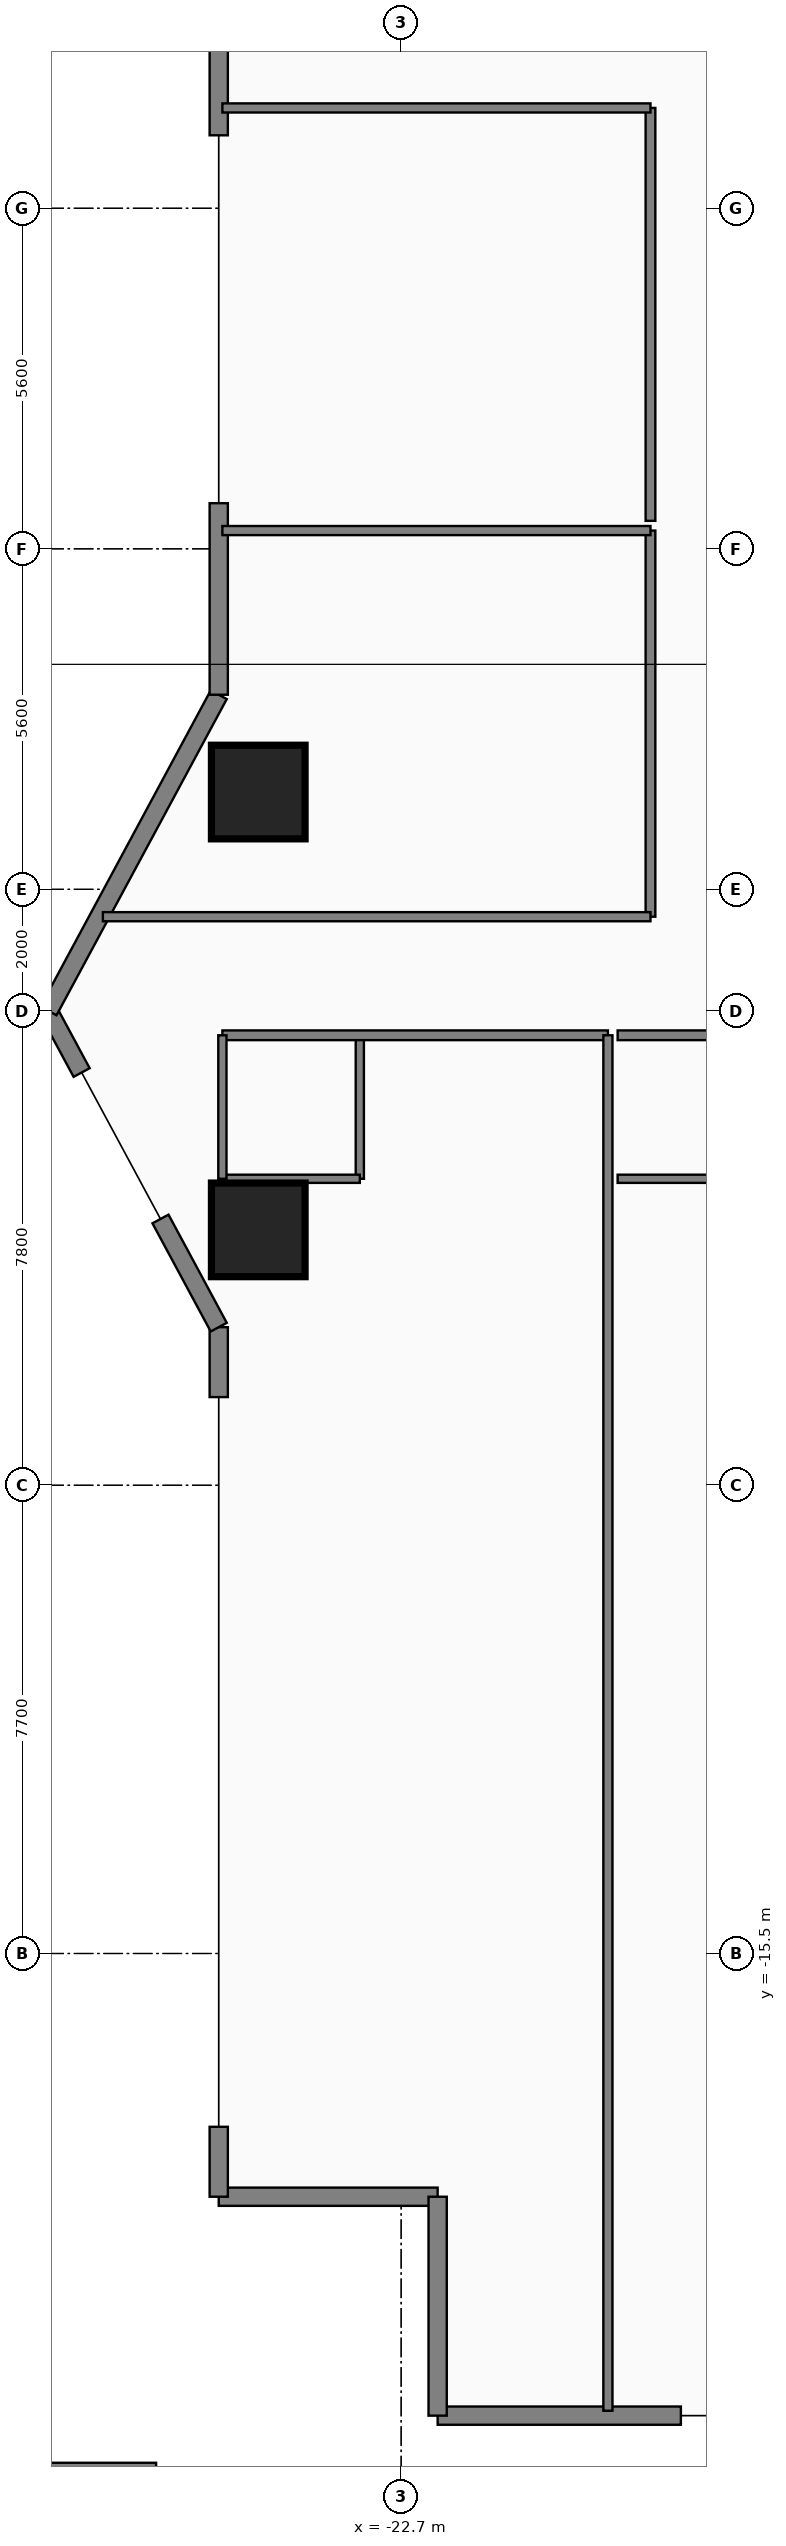
"""IFC4 building model, lengths in metres.
Left out: names, types, materials, properties, quantities, classifications, styles, units other than length and angle.
Written with IfcOpenShell. Run it as: python <this file> out.ifc"""

import sys

from ifc_helpers import new_model, si_unit, direction, frame, frame_2d, origin, origin_2d, place, context, subcontext, project, spatial, rectangle, extrude, element, fill, save


model = new_model("IFC4")
c1 = context("Model", 3, precision=1e-05, world=origin(), true_north=direction((0.0, 1.0)))
c2 = subcontext(c1, "Body", "Model", "MODEL_VIEW")
j1 = project(units=[si_unit("LENGTHUNIT", "METRE"), si_unit("PLANEANGLEUNIT", "RADIAN")], contexts=[c1])
p1 = place(None, origin())
s1 = spatial("IfcSite", under=j1, at=p1, CompositionType="ELEMENT")
p2 = place(p1, origin())
s2 = spatial("IfcBuilding", under=s1, at=p2, CompositionType="ELEMENT")
p3 = place(p2, frame((0.0, 0.0, 27.6)))
s3 = spatial("IfcBuildingStorey", under=s2, at=p3, CompositionType="ELEMENT", Elevation=27.6)
for number, where, z_axis, x_axis in (
    (1, (-25.05, -3.6, 0.0), (0.0, 0.0, 1.0), (1.0, 0.0, 0.0)),
    (2, (-25.05, 3.6, 0.0), (0.0, 0.0, 1.0), (1.0, 0.0, 0.0)),
):
    element("IfcColumn", number, at=place(p3, frame(where, z_axis=z_axis, x_axis=x_axis)), inside=s3, PredefinedType="COLUMN", context=c2, shape_type="SweptSolid", body=[
        extrude(rectangle(XDim=1.5, YDim=1.5, at=origin_2d()), origin(), (0.0, 0.0, 1.0), 3.65),
    ])
p4 = place(p3, frame((-26.73, -24.0, 0.0), z_axis=(0.0, 0.0, 1.0), x_axis=(-1.0, 0.0, 0.0)))
e3 = element("IfcWall", 3, at=p4, inside=s3, PredefinedType="PARAPET", context=c2, shape_type="SweptSolid", body=[
    extrude(rectangle(XDim=5.09, YDim=0.25, at=frame_2d((2.545, 0.0))), origin(), (0.0, 0.0, 1.0), 1.15),
])
p5 = place(p3, frame((-22.1, -19.5, 0.0), z_axis=(0.0, 0.0, 1.0), x_axis=(-1.0, 0.0, 0.0)))
e4 = element("IfcWall", 4, at=p5, inside=s3, PredefinedType="STANDARD", context=c2, shape_type="SweptSolid", body=[
    extrude(rectangle(XDim=3.6, YDim=0.3, at=frame_2d((1.8, 0.0))), origin(), (0.0, 0.0, 1.0), 3.43),
])
p6 = place(p3, frame((-25.7, -19.5, 0.0), z_axis=(0.0, 0.0, 1.0), x_axis=(0.0, 1.0, 0.0)))
e5 = element("IfcWall", 5, at=p6, inside=s3, PredefinedType="STANDARD", context=c2, shape_type="SweptSolid", body=[
    extrude(rectangle(XDim=1.15, YDim=0.3, at=frame_2d((0.575, 0.0))), origin(), (0.0, 0.0, 1.0), 3.43),
])
p7 = place(p3, frame((-25.7, -6.35, 0.0), z_axis=(0.0, 0.0, 1.0), x_axis=(0.0, 1.0, 0.0)))
e6 = element("IfcWall", 6, at=p7, inside=s3, PredefinedType="STANDARD", context=c2, shape_type="SweptSolid", body=[
    extrude(rectangle(XDim=1.15, YDim=0.3, at=frame_2d((0.575, 0.0))), origin(), (0.0, 0.0, 1.0), 3.43),
])
p8 = place(p3, frame((-25.7, -5.2, 0.0), z_axis=(0.0, 0.0, 1.0), x_axis=(-0.474121438562, 0.88045946045, 0.0)))
e7 = element("IfcWall", 7, at=p8, inside=s3, PredefinedType="STANDARD", context=c2, shape_type="SweptSolid", body=[
    extrude(rectangle(XDim=2.021, YDim=0.3, at=frame_2d((1.01, 0.0))), origin(), (0.0, 0.0, 1.0), 3.43),
])
p9 = place(p3, frame((-27.955, -1.012, 0.0), z_axis=(0.0, 0.0, 1.0), x_axis=(-0.474099823035, 0.880471099922, 0.0)))
e8 = element("IfcWall", 8, at=p9, inside=s3, PredefinedType="STANDARD", context=c2, shape_type="SweptSolid", body=[
    extrude(rectangle(XDim=1.15, YDim=0.3, at=frame_2d((0.575, 0.0))), origin(), (0.0, 0.0, 1.0), 3.43),
])
p10 = place(p3, frame((-28.5, 0.0, 0.0), z_axis=(0.0, 0.0, 1.0), x_axis=(0.474109683532, 0.880465790352, 0.0)))
e9 = element("IfcWall", 9, at=p10, inside=s3, PredefinedType="STANDARD", context=c2, shape_type="SweptSolid", body=[
    extrude(rectangle(XDim=5.906, YDim=0.3, at=frame_2d((2.953, 0.0))), origin(), (0.0, 0.0, 1.0), 3.43),
])
p11 = place(p10, frame((2.432, 0.0, 0.95)))
e10 = element("IfcOpeningElement", 10, at=p11, cuts=e9, PredefinedType="OPENING", context=c2, shape_type="SweptSolid", body=[
    extrude(rectangle(XDim=1.15, YDim=1.55, at=frame_2d((0.575, 0.775))), frame((0.0, 0.16, 0.0), z_axis=(0.0, -1.0, 0.0), x_axis=(1.0, 0.0, 0.0)), (0.0, 0.0, 1.0), 0.32),
])
p12 = place(p3, frame((-25.7, 5.2, 0.0), z_axis=(0.0, 0.0, 1.0), x_axis=(0.0, 1.0, 0.0)))
e11 = element("IfcWall", 11, at=p12, inside=s3, PredefinedType="STANDARD", context=c2, shape_type="SweptSolid", body=[
    extrude(rectangle(XDim=3.15, YDim=0.3, at=frame_2d((1.575, 0.0))), origin(), (0.0, 0.0, 1.0), 3.43),
])
p13 = place(p12, frame((0.835, 0.0, 0.95)))
e12 = element("IfcOpeningElement", 12, at=p13, cuts=e11, PredefinedType="OPENING", context=c2, shape_type="SweptSolid", body=[
    extrude(rectangle(XDim=1.15, YDim=1.55, at=frame_2d((0.575, 0.775))), frame((0.0, 0.16, 0.0), z_axis=(0.0, -1.0, 0.0), x_axis=(1.0, 0.0, 0.0)), (0.0, 0.0, 1.0), 0.32),
])
p14 = place(p3, frame((-25.7, 14.4, 0.0), z_axis=(0.0, 0.0, 1.0), x_axis=(0.0, 1.0, 0.0)))
e13 = element("IfcWall", 13, at=p14, inside=s3, PredefinedType="STANDARD", context=c2, shape_type="SweptSolid", body=[
    extrude(rectangle(XDim=5.1, YDim=0.3, at=frame_2d((2.55, 0.0))), origin(), (0.0, 0.0, 1.0), 3.43),
])
p15 = place(p14, frame((0.8, 0.0, 0.95)))
e14 = element("IfcOpeningElement", 14, at=p15, cuts=e13, PredefinedType="OPENING", context=c2, shape_type="SweptSolid", body=[
    extrude(rectangle(XDim=1.15, YDim=1.55, at=frame_2d((0.575, 0.775))), frame((0.0, 0.16, 0.0), z_axis=(0.0, -1.0, 0.0), x_axis=(1.0, 0.0, 0.0)), (0.0, 0.0, 1.0), 0.32),
])
p16 = place(p14, frame((2.84, 0.0, 0.85)))
e15 = element("IfcOpeningElement", 15, at=p16, cuts=e13, PredefinedType="OPENING", context=c2, shape_type="SweptSolid", body=[
    extrude(rectangle(XDim=1.6, YDim=1.8, at=frame_2d((0.8, 0.9))), frame((0.0, 0.16, 0.0), z_axis=(0.0, -1.0, 0.0), x_axis=(1.0, 0.0, 0.0)), (0.0, 0.0, 1.0), 0.32),
])
p17 = place(p3, frame((-18.1, -23.1, 0.0), z_axis=(0.0, 0.0, 1.0), x_axis=(-1.0, 0.0, 0.0)))
e16 = element("IfcWall", 16, at=p17, inside=s3, PredefinedType="STANDARD", context=c2, shape_type="SweptSolid", body=[
    extrude(rectangle(XDim=4.0, YDim=0.3, at=frame_2d((2.0, 0.0))), origin(), (0.0, 0.0, 1.0), 3.43),
])
p18 = place(p17, frame((1.74, 0.0, 0.85)))
e17 = element("IfcOpeningElement", 17, at=p18, cuts=e16, PredefinedType="OPENING", context=c2, shape_type="SweptSolid", body=[
    extrude(rectangle(XDim=1.6, YDim=1.8, at=frame_2d((0.8, 0.9))), frame((0.0, 0.16, 0.0), z_axis=(0.0, -1.0, 0.0), x_axis=(1.0, 0.0, 0.0)), (0.0, 0.0, 1.0), 0.32),
])
p19 = place(p3, frame((-22.1, -23.1, 0.0), z_axis=(0.0, 0.0, 1.0), x_axis=(0.0, 1.0, 0.0)))
e18 = element("IfcWall", 18, at=p19, inside=s3, PredefinedType="STANDARD", context=c2, shape_type="SweptSolid", body=[
    extrude(rectangle(XDim=3.6, YDim=0.3, at=frame_2d((1.8, 0.0))), origin(), (0.0, 0.0, 1.0), 3.43),
])
p20 = place(p19, frame((0.22, 0.0, 0.0)))
e19 = element("IfcOpeningElement", 19, at=p20, cuts=e18, PredefinedType="OPENING", context=c2, shape_type="SweptSolid", body=[
    extrude(rectangle(XDim=1.05, YDim=2.2, at=frame_2d((0.525, 1.1))), frame((0.0, 0.16, 0.0), z_axis=(0.0, -1.0, 0.0), x_axis=(1.0, 0.0, 0.0)), (0.0, 0.0, 1.0), 0.32),
])
p21 = place(p3, frame((-23.38, -2.76, 0.0), z_axis=(0.0, 0.0, 1.0), x_axis=(0.0, 1.0, 0.0)))
e20 = element("IfcWall", 20, at=p21, inside=s3, PredefinedType="PLUMBINGWALL", context=c2, shape_type="SweptSolid", body=[
    extrude(rectangle(XDim=2.36, YDim=0.135, at=frame_2d((1.18, 0.0))), origin(), (0.0, 0.0, 1.0), 3.43),
])
p22 = place(p21, frame((0.65, 0.0, 0.0)))
e21 = element("IfcOpeningElement", 21, at=p22, cuts=e20, PredefinedType="OPENING", context=c2, shape_type="SweptSolid", body=[
    extrude(rectangle(XDim=0.85, YDim=2.1, at=frame_2d((0.425, 1.05))), frame((0.0, 0.077, 0.0), z_axis=(0.0, -1.0, 0.0), x_axis=(1.0, 0.0, 0.0)), (0.0, 0.0, 1.0), 0.155),
])
p23 = place(p3, frame((-25.64, -0.4, 0.0), z_axis=(0.0, 0.0, 1.0), x_axis=(1.0, 0.0, 0.0)))
e22 = element("IfcWall", 22, at=p23, inside=s3, PredefinedType="PARTITIONING", context=c2, shape_type="SweptSolid", body=[
    extrude(rectangle(XDim=6.34, YDim=0.16, at=frame_2d((3.17, 0.0))), origin(), (0.0, 0.0, 1.0), 3.43),
])
p24 = place(p23, frame((3.82, 0.0, 0.0)))
e23 = element("IfcOpeningElement", 23, at=p24, cuts=e22, PredefinedType="OPENING", context=c2, shape_type="SweptSolid", body=[
    extrude(rectangle(XDim=1.0, YDim=2.15, at=frame_2d((0.5, 1.075))), frame((0.0, 0.09, 0.0), z_axis=(0.0, -1.0, 0.0), x_axis=(1.0, 0.0, 0.0)), (0.0, 0.0, 1.0), 0.18),
])
p25 = place(p3, frame((-19.14, -0.4, 0.0), z_axis=(0.0, 0.0, 1.0), x_axis=(1.0, 0.0, 0.0)))
e24 = element("IfcWall", 24, at=p25, inside=s3, PredefinedType="PARTITIONING", context=c2, shape_type="SweptSolid", body=[
    extrude(rectangle(XDim=6.34, YDim=0.16, at=frame_2d((3.17, 0.0))), origin(), (0.0, 0.0, 1.0), 3.43),
])
p26 = place(p25, frame((3.82, 0.0, 0.0)))
e25 = element("IfcOpeningElement", 25, at=p26, cuts=e24, PredefinedType="OPENING", context=c2, shape_type="SweptSolid", body=[
    extrude(rectangle(XDim=1.0, YDim=2.15, at=frame_2d((0.5, 1.075))), frame((0.0, 0.09, 0.0), z_axis=(0.0, -1.0, 0.0), x_axis=(1.0, 0.0, 0.0)), (0.0, 0.0, 1.0), 0.18),
])
p27 = place(p3, frame((-18.6, 1.55, 0.0), z_axis=(0.0, 0.0, 1.0), x_axis=(0.0, 1.0, 0.0)))
e26 = element("IfcWall", 26, at=p27, inside=s3, PredefinedType="PARTITIONING", context=c2, shape_type="SweptSolid", body=[
    extrude(rectangle(XDim=6.35, YDim=0.16, at=frame_2d((3.175, 0.0))), origin(), (0.0, 0.0, 1.0), 3.43),
])
p28 = place(p27, frame((2.7, 0.0, 0.0)))
e27 = element("IfcOpeningElement", 27, at=p28, cuts=e26, PredefinedType="OPENING", context=c2, shape_type="SweptSolid", body=[
    extrude(rectangle(XDim=0.95, YDim=2.15, at=frame_2d((0.475, 1.075))), frame((0.0, 0.09, 0.0), z_axis=(0.0, -1.0, 0.0), x_axis=(1.0, 0.0, 0.0)), (0.0, 0.0, 1.0), 0.18),
])
p29 = place(p3, frame((-18.6, 8.06, 0.0), z_axis=(0.0, 0.0, 1.0), x_axis=(0.0, 1.0, 0.0)))
e28 = element("IfcWall", 28, at=p29, inside=s3, PredefinedType="PARTITIONING", context=c2, shape_type="SweptSolid", body=[
    extrude(rectangle(XDim=6.79, YDim=0.16, at=frame_2d((3.395, 0.0))), origin(), (0.0, 0.0, 1.0), 3.43),
])
p30 = place(p29, frame((2.92, 0.0, 0.0)))
e29 = element("IfcOpeningElement", 29, at=p30, cuts=e28, PredefinedType="OPENING", context=c2, shape_type="SweptSolid", body=[
    extrude(rectangle(XDim=0.95, YDim=2.15, at=frame_2d((0.475, 1.075))), frame((0.0, 0.09, 0.0), z_axis=(0.0, -1.0, 0.0), x_axis=(1.0, 0.0, 0.0)), (0.0, 0.0, 1.0), 0.18),
])
p31 = place(p3, frame((-25.64, -2.76, 0.0), z_axis=(0.0, 0.0, 1.0), x_axis=(1.0, 0.0, 0.0)))
e30 = element("IfcWall", 30, at=p31, inside=s3, PredefinedType="PLUMBINGWALL", context=c2, shape_type="SweptSolid", body=[
    extrude(rectangle(XDim=2.26, YDim=0.135, at=frame_2d((1.13, 0.0))), origin(), (0.0, 0.0, 1.0), 3.43),
])
p32 = place(p3, frame((-25.64, -2.76, 0.0), z_axis=(0.0, 0.0, 1.0), x_axis=(0.0, 1.0, 0.0)))
e31 = element("IfcWall", 31, at=p32, inside=s3, PredefinedType="PLUMBINGWALL", context=c2, shape_type="SweptSolid", body=[
    extrude(rectangle(XDim=2.36, YDim=0.135, at=frame_2d((1.18, 0.0))), origin(), (0.0, 0.0, 1.0), 3.43),
])
p33 = place(p3, frame((-19.3, -23.02, 0.0), z_axis=(0.0, 0.0, 1.0), x_axis=(0.0, 1.0, 0.0)))
e32 = element("IfcWall", 32, at=p33, inside=s3, PredefinedType="PARTITIONING", context=c2, shape_type="SweptSolid", body=[
    extrude(rectangle(XDim=22.62, YDim=0.15, at=frame_2d((11.31, 0.0))), origin(), (0.0, 0.0, 1.0), 3.43),
])
p34 = place(p3, frame((-19.14, -2.76, 0.0), z_axis=(0.0, 0.0, 1.0), x_axis=(1.0, 0.0, 0.0)))
e33 = element("IfcWall", 33, at=p34, inside=s3, PredefinedType="PLUMBINGWALL", context=c2, shape_type="SweptSolid", body=[
    extrude(rectangle(XDim=2.26, YDim=0.135, at=frame_2d((1.13, 0.0))), origin(), (0.0, 0.0, 1.0), 3.43),
])
p35 = place(p3, frame((-27.605, 1.55, 0.0), z_axis=(0.0, 0.0, 1.0), x_axis=(1.0, 0.0, 0.0)))
e34 = element("IfcWall", 34, at=p35, inside=s3, PredefinedType="PARTITIONING", context=c2, shape_type="SweptSolid", body=[
    extrude(rectangle(XDim=9.005, YDim=0.15, at=frame_2d((4.503, 0.0))), origin(), (0.0, 0.0, 1.0), 3.43),
])
for number, where, z_axis, x_axis in (
    (35, (-25.64, 7.9, 0.0), (0.0, 0.0, 1.0), (1.0, 0.0, 0.0)),
    (36, (-25.64, 14.85, 0.0), (0.0, 0.0, 1.0), (1.0, 0.0, 0.0)),
):
    element("IfcWall", number, at=place(p3, frame(where, z_axis=z_axis, x_axis=x_axis)), inside=s3, PredefinedType="PARTITIONING", context=c2, shape_type="SweptSolid", body=[
        extrude(rectangle(XDim=7.04, YDim=0.15, at=frame_2d((3.52, 0.0))), origin(), (0.0, 0.0, 1.0), 3.43),
    ])
p36 = place(p3, frame((0.0, 0.0, -0.22)))
p37 = place(p36, frame((-29.05, -14.0, 0.0)))
p38 = place(p37, frame((0.0, 0.0, 0.17)))
e37 = element("IfcWindow", 37, at=p38, inside=s3, PartitioningType="SINGLE_PANEL", PredefinedType="SKYLIGHT", context=c2, shape_type="SweptSolid", body=[
    extrude(rectangle(XDim=1.8, YDim=1.8, at=origin_2d()), origin(), (0.0, 0.0, 1.0), 0.05),
])
p39 = place(p36, frame((-29.05, 0.0, 0.0)))
p40 = place(p39, frame((0.0, 0.0, 0.17)))
e38 = element("IfcWindow", 38, at=p40, inside=s3, PartitioningType="SINGLE_PANEL", PredefinedType="SKYLIGHT", context=c2, shape_type="SweptSolid", body=[
    extrude(rectangle(XDim=1.8, YDim=1.8, at=origin_2d()), origin(), (0.0, 0.0, 1.0), 0.05),
])
p41 = place(p36, frame((-29.05, 12.0, 0.0)))
p42 = place(p41, frame((0.0, 0.0, 0.17)))
e39 = element("IfcWindow", 39, at=p42, inside=s3, PartitioningType="SINGLE_PANEL", PredefinedType="SKYLIGHT", context=c2, shape_type="SweptSolid", body=[
    extrude(rectangle(XDim=1.8, YDim=1.8, at=origin_2d()), origin(), (0.0, 0.0, 1.0), 0.05),
])
p43 = place(p11, origin())
e40 = element("IfcWindow", 40, at=p43, inside=s3, PartitioningType="SINGLE_PANEL", PredefinedType="WINDOW", context=c2, shape_type="SweptSolid", body=[
    extrude(rectangle(XDim=1.15, YDim=1.55, at=frame_2d((0.575, 0.775))), frame((0.0, 0.03, 0.0), z_axis=(0.0, -1.0, 0.0), x_axis=(1.0, 0.0, 0.0)), (0.0, 0.0, 1.0), 0.06),
])
fill(e10, e40)
p44 = place(p13, origin())
e41 = element("IfcWindow", 41, at=p44, inside=s3, PartitioningType="SINGLE_PANEL", PredefinedType="WINDOW", context=c2, shape_type="SweptSolid", body=[
    extrude(rectangle(XDim=1.15, YDim=1.55, at=frame_2d((0.575, 0.775))), frame((0.0, 0.03, 0.0), z_axis=(0.0, -1.0, 0.0), x_axis=(1.0, 0.0, 0.0)), (0.0, 0.0, 1.0), 0.06),
])
fill(e12, e41)
p45 = place(p15, origin())
e42 = element("IfcWindow", 42, at=p45, inside=s3, PartitioningType="SINGLE_PANEL", PredefinedType="WINDOW", context=c2, shape_type="SweptSolid", body=[
    extrude(rectangle(XDim=1.15, YDim=1.55, at=frame_2d((0.575, 0.775))), frame((0.0, 0.03, 0.0), z_axis=(0.0, -1.0, 0.0), x_axis=(1.0, 0.0, 0.0)), (0.0, 0.0, 1.0), 0.06),
])
fill(e14, e42)
p46 = place(p18, origin())
e43 = element("IfcWindow", 43, at=p46, inside=s3, PartitioningType="SINGLE_PANEL", PredefinedType="WINDOW", context=c2, shape_type="SweptSolid", body=[
    extrude(rectangle(XDim=1.6, YDim=1.8, at=frame_2d((0.8, 0.9))), frame((0.0, 0.03, 0.0), z_axis=(0.0, -1.0, 0.0), x_axis=(1.0, 0.0, 0.0)), (0.0, 0.0, 1.0), 0.06),
])
fill(e17, e43)
p47 = place(p20, origin())
e44 = element("IfcDoor", 44, at=p47, inside=s3, OperationType="SINGLE_SWING_LEFT", PredefinedType="DOOR", context=c2, shape_type="SweptSolid", body=[
    extrude(rectangle(XDim=1.05, YDim=2.2, at=frame_2d((0.525, 1.1))), frame((0.0, 0.025, 0.0), z_axis=(0.0, -1.0, 0.0), x_axis=(1.0, 0.0, 0.0)), (0.0, 0.0, 1.0), 0.05),
])
fill(e19, e44)
p48 = place(p22, origin())
e45 = element("IfcDoor", 45, at=p48, inside=s3, OperationType="SINGLE_SWING_LEFT", PredefinedType="DOOR", context=c2, shape_type="SweptSolid", body=[
    extrude(rectangle(XDim=0.85, YDim=2.1, at=frame_2d((0.425, 1.05))), frame((0.0, 0.025, 0.0), z_axis=(0.0, -1.0, 0.0), x_axis=(1.0, 0.0, 0.0)), (0.0, 0.0, 1.0), 0.05),
])
fill(e21, e45)
p49 = place(p24, origin())
e46 = element("IfcDoor", 46, at=p49, inside=s3, OperationType="SINGLE_SWING_RIGHT", PredefinedType="DOOR", context=c2, shape_type="SweptSolid", body=[
    extrude(rectangle(XDim=1.0, YDim=2.15, at=frame_2d((0.5, 1.075))), frame((0.0, 0.025, 0.0), z_axis=(0.0, -1.0, 0.0), x_axis=(1.0, 0.0, 0.0)), (0.0, 0.0, 1.0), 0.05),
])
fill(e23, e46)
p50 = place(p28, origin())
e47 = element("IfcDoor", 47, at=p50, inside=s3, OperationType="SINGLE_SWING_RIGHT", PredefinedType="DOOR", context=c2, shape_type="SweptSolid", body=[
    extrude(rectangle(XDim=0.95, YDim=2.15, at=frame_2d((0.475, 1.075))), frame((0.0, 0.025, 0.0), z_axis=(0.0, -1.0, 0.0), x_axis=(1.0, 0.0, 0.0)), (0.0, 0.0, 1.0), 0.05),
])
fill(e27, e47)
p51 = place(p30, origin())
e48 = element("IfcDoor", 48, at=p51, inside=s3, OperationType="SINGLE_SWING_LEFT", PredefinedType="DOOR", context=c2, shape_type="SweptSolid", body=[
    extrude(rectangle(XDim=0.95, YDim=2.15, at=frame_2d((0.475, 1.075))), frame((0.0, 0.025, 0.0), z_axis=(0.0, -1.0, 0.0), x_axis=(1.0, 0.0, 0.0)), (0.0, 0.0, 1.0), 0.05),
])
fill(e29, e48)
save(model, sys.argv[1])
